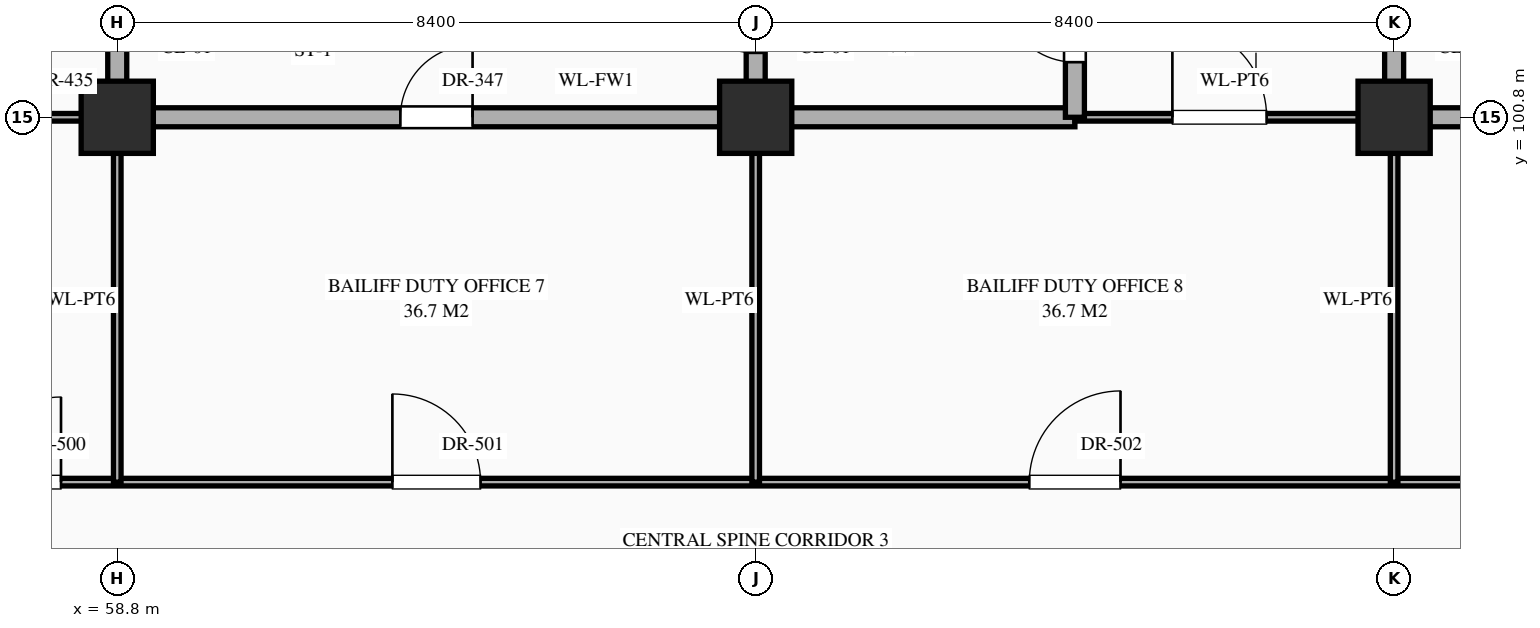
"""IFC4 building model, lengths in metres.
Left out: names, types, materials, properties, quantities, classifications, styles, units other than length and angle.
Written with IfcOpenShell. Run it as: python <this file> out.ifc"""

import sys

from ifc_helpers import new_model, si_unit, direction, frame, frame_2d, origin, origin_2d, place, context, subcontext, project, spatial, rectangle, extrude, element, fill, save


model = new_model("IFC4")
c1 = context("Model", 3, precision=1e-05, world=origin(), true_north=direction((0.0, 1.0)))
c2 = subcontext(c1, "Body", "Model", "MODEL_VIEW")
j1 = project(units=[si_unit("LENGTHUNIT", "METRE"), si_unit("PLANEANGLEUNIT", "RADIAN")], contexts=[c1])
p1 = place(None, origin())
s1 = spatial("IfcSite", under=j1, at=p1, CompositionType="ELEMENT")
p2 = place(p1, origin())
s2 = spatial("IfcBuilding", under=s1, at=p2, CompositionType="ELEMENT")
p3 = place(p2, frame((0.0, 0.0, -5.4)))
s3 = spatial("IfcBuildingStorey", under=s2, at=p3, CompositionType="ELEMENT", Elevation=-5.4)
for number, where, z_axis, x_axis in (
    (1, (58.8, 100.8, 0.0), (0.0, 0.0, 1.0), (1.0, 0.0, 0.0)),
    (2, (67.2, 100.8, 0.0), (0.0, 0.0, 1.0), (1.0, 0.0, 0.0)),
    (3, (75.6, 100.8, 0.0), (0.0, 0.0, 1.0), (1.0, 0.0, 0.0)),
):
    element("IfcColumn", number, at=place(p3, frame(where, z_axis=z_axis, x_axis=x_axis)), inside=s3, PredefinedType="COLUMN", context=c2, shape_type="SweptSolid", body=[
        extrude(rectangle(XDim=0.95, YDim=0.95, at=origin_2d()), origin(), (0.0, 0.0, 1.0), 5.4),
    ])
p4 = place(p3, frame((16.8, 96.0, 0.0), z_axis=(0.0, 0.0, 1.0), x_axis=(1.0, 0.0, 0.0)))
e4 = element("IfcWall", 4, at=p4, inside=s3, PredefinedType="STANDARD", context=c2, shape_type="SweptSolid", body=[
    extrude(rectangle(XDim=134.4, YDim=0.1, at=frame_2d((67.2, 0.0))), origin(), (0.0, 0.0, 1.0), 5.1),
])
p5 = place(p4, frame((3.56, 0.0, 0.0)))
e5 = element("IfcOpeningElement", 5, at=p5, cuts=e4, PredefinedType="OPENING", context=c2, shape_type="SweptSolid", body=[
    extrude(rectangle(XDim=1.28, YDim=2.35, at=frame_2d((0.64, 1.175))), frame((0.0, 0.062, 0.0), z_axis=(0.0, -1.0, 0.0), x_axis=(1.0, 0.0, 0.0)), (0.0, 0.0, 1.0), 0.124),
])
p6 = place(p4, frame((9.63, 0.0, 0.0)))
e6 = element("IfcOpeningElement", 6, at=p6, cuts=e4, PredefinedType="OPENING", context=c2, shape_type="SweptSolid", body=[
    extrude(rectangle(XDim=0.94, YDim=2.3, at=frame_2d((0.47, 1.15))), frame((0.0, 0.062, 0.0), z_axis=(0.0, -1.0, 0.0), x_axis=(1.0, 0.0, 0.0)), (0.0, 0.0, 1.0), 0.124),
])
p7 = place(p4, frame((12.51, 0.0, 0.0)))
e7 = element("IfcOpeningElement", 7, at=p7, cuts=e4, PredefinedType="OPENING", context=c2, shape_type="SweptSolid", body=[
    extrude(rectangle(XDim=0.98, YDim=2.35, at=frame_2d((0.49, 1.175))), frame((0.0, 0.062, 0.0), z_axis=(0.0, -1.0, 0.0), x_axis=(1.0, 0.0, 0.0)), (0.0, 0.0, 1.0), 0.124),
])
p8 = place(p4, frame((14.99, 0.0, 0.0)))
e8 = element("IfcOpeningElement", 8, at=p8, cuts=e4, PredefinedType="OPENING", context=c2, shape_type="SweptSolid", body=[
    extrude(rectangle(XDim=1.02, YDim=2.4, at=frame_2d((0.51, 1.2))), frame((0.0, 0.062, 0.0), z_axis=(0.0, -1.0, 0.0), x_axis=(1.0, 0.0, 0.0)), (0.0, 0.0, 1.0), 0.124),
])
p9 = place(p4, frame((20.47, 0.0, 0.0)))
e9 = element("IfcOpeningElement", 9, at=p9, cuts=e4, PredefinedType="OPENING", context=c2, shape_type="SweptSolid", body=[
    extrude(rectangle(XDim=1.06, YDim=2.4, at=frame_2d((0.53, 1.2))), frame((0.0, 0.062, 0.0), z_axis=(0.0, -1.0, 0.0), x_axis=(1.0, 0.0, 0.0)), (0.0, 0.0, 1.0), 0.124),
])
p10 = place(p4, frame((28.83, 0.0, 0.0)))
e10 = element("IfcOpeningElement", 10, at=p10, cuts=e4, PredefinedType="OPENING", context=c2, shape_type="SweptSolid", body=[
    extrude(rectangle(XDim=1.14, YDim=2.4, at=frame_2d((0.57, 1.2))), frame((0.0, 0.062, 0.0), z_axis=(0.0, -1.0, 0.0), x_axis=(1.0, 0.0, 0.0)), (0.0, 0.0, 1.0), 0.124),
])
p11 = place(p4, frame((34.78, 0.0, 0.0)))
e11 = element("IfcOpeningElement", 11, at=p11, cuts=e4, PredefinedType="OPENING", context=c2, shape_type="SweptSolid", body=[
    extrude(rectangle(XDim=1.04, YDim=2.2, at=frame_2d((0.52, 1.1))), frame((0.0, 0.062, 0.0), z_axis=(0.0, -1.0, 0.0), x_axis=(1.0, 0.0, 0.0)), (0.0, 0.0, 1.0), 0.124),
])
p12 = place(p4, frame((37.66, 0.0, 0.0)))
e12 = element("IfcOpeningElement", 12, at=p12, cuts=e4, PredefinedType="OPENING", context=c2, shape_type="SweptSolid", body=[
    extrude(rectangle(XDim=1.08, YDim=2.25, at=frame_2d((0.54, 1.125))), frame((0.0, 0.062, 0.0), z_axis=(0.0, -1.0, 0.0), x_axis=(1.0, 0.0, 0.0)), (0.0, 0.0, 1.0), 0.124),
])
p13 = place(p4, frame((40.14, 0.0, 0.0)))
e13 = element("IfcOpeningElement", 13, at=p13, cuts=e4, PredefinedType="OPENING", context=c2, shape_type="SweptSolid", body=[
    extrude(rectangle(XDim=1.12, YDim=2.25, at=frame_2d((0.56, 1.125))), frame((0.0, 0.062, 0.0), z_axis=(0.0, -1.0, 0.0), x_axis=(1.0, 0.0, 0.0)), (0.0, 0.0, 1.0), 0.124),
])
p14 = place(p4, frame((45.62, 0.0, 0.0)))
e14 = element("IfcOpeningElement", 14, at=p14, cuts=e4, PredefinedType="OPENING", context=c2, shape_type="SweptSolid", body=[
    extrude(rectangle(XDim=1.16, YDim=2.3, at=frame_2d((0.58, 1.15))), frame((0.0, 0.062, 0.0), z_axis=(0.0, -1.0, 0.0), x_axis=(1.0, 0.0, 0.0)), (0.0, 0.0, 1.0), 0.124),
])
p15 = place(p4, frame((54.0, 0.0, 0.0)))
e15 = element("IfcOpeningElement", 15, at=p15, cuts=e4, PredefinedType="OPENING", context=c2, shape_type="SweptSolid", body=[
    extrude(rectangle(XDim=1.2, YDim=2.35, at=frame_2d((0.6, 1.175))), frame((0.0, 0.062, 0.0), z_axis=(0.0, -1.0, 0.0), x_axis=(1.0, 0.0, 0.0)), (0.0, 0.0, 1.0), 0.124),
])
p16 = place(p4, frame((62.38, 0.0, 0.0)))
e16 = element("IfcOpeningElement", 16, at=p16, cuts=e4, PredefinedType="OPENING", context=c2, shape_type="SweptSolid", body=[
    extrude(rectangle(XDim=1.24, YDim=2.3, at=frame_2d((0.62, 1.15))), frame((0.0, 0.062, 0.0), z_axis=(0.0, -1.0, 0.0), x_axis=(1.0, 0.0, 0.0)), (0.0, 0.0, 1.0), 0.124),
])
p17 = place(p4, frame((68.37, 0.0, 0.0)))
e17 = element("IfcOpeningElement", 17, at=p17, cuts=e4, PredefinedType="OPENING", context=c2, shape_type="SweptSolid", body=[
    extrude(rectangle(XDim=1.06, YDim=2.4, at=frame_2d((0.53, 1.2))), frame((0.0, 0.062, 0.0), z_axis=(0.0, -1.0, 0.0), x_axis=(1.0, 0.0, 0.0)), (0.0, 0.0, 1.0), 0.124),
])
p18 = place(p4, frame((71.23, 0.0, 0.0)))
e18 = element("IfcOpeningElement", 18, at=p18, cuts=e4, PredefinedType="OPENING", context=c2, shape_type="SweptSolid", body=[
    extrude(rectangle(XDim=1.14, YDim=2.4, at=frame_2d((0.57, 1.2))), frame((0.0, 0.062, 0.0), z_axis=(0.0, -1.0, 0.0), x_axis=(1.0, 0.0, 0.0)), (0.0, 0.0, 1.0), 0.124),
])
p19 = place(p4, frame((73.85, 0.0, 0.0)))
e19 = element("IfcOpeningElement", 19, at=p19, cuts=e4, PredefinedType="OPENING", context=c2, shape_type="SweptSolid", body=[
    extrude(rectangle(XDim=0.9, YDim=2.15, at=frame_2d((0.45, 1.075))), frame((0.0, 0.062, 0.0), z_axis=(0.0, -1.0, 0.0), x_axis=(1.0, 0.0, 0.0)), (0.0, 0.0, 1.0), 0.124),
])
p20 = place(p4, frame((79.37, 0.0, 0.0)))
e20 = element("IfcOpeningElement", 20, at=p20, cuts=e4, PredefinedType="OPENING", context=c2, shape_type="SweptSolid", body=[
    extrude(rectangle(XDim=0.86, YDim=2.1, at=frame_2d((0.43, 1.05))), frame((0.0, 0.062, 0.0), z_axis=(0.0, -1.0, 0.0), x_axis=(1.0, 0.0, 0.0)), (0.0, 0.0, 1.0), 0.124),
])
p21 = place(p4, frame((87.74, 0.0, 0.0)))
e21 = element("IfcOpeningElement", 21, at=p21, cuts=e4, PredefinedType="OPENING", context=c2, shape_type="SweptSolid", body=[
    extrude(rectangle(XDim=0.92, YDim=2.15, at=frame_2d((0.46, 1.075))), frame((0.0, 0.062, 0.0), z_axis=(0.0, -1.0, 0.0), x_axis=(1.0, 0.0, 0.0)), (0.0, 0.0, 1.0), 0.124),
])
p22 = place(p4, frame((93.62, 0.0, 0.0)))
e22 = element("IfcOpeningElement", 22, at=p22, cuts=e4, PredefinedType="OPENING", context=c2, shape_type="SweptSolid", body=[
    extrude(rectangle(XDim=0.96, YDim=2.2, at=frame_2d((0.48, 1.1))), frame((0.0, 0.062, 0.0), z_axis=(0.0, -1.0, 0.0), x_axis=(1.0, 0.0, 0.0)), (0.0, 0.0, 1.0), 0.124),
])
p23 = place(p4, frame((96.5, 0.0, 0.0)))
e23 = element("IfcOpeningElement", 23, at=p23, cuts=e4, PredefinedType="OPENING", context=c2, shape_type="SweptSolid", body=[
    extrude(rectangle(XDim=1.0, YDim=2.25, at=frame_2d((0.5, 1.125))), frame((0.0, 0.062, 0.0), z_axis=(0.0, -1.0, 0.0), x_axis=(1.0, 0.0, 0.0)), (0.0, 0.0, 1.0), 0.124),
])
p24 = place(p4, frame((98.98, 0.0, 0.0)))
e24 = element("IfcOpeningElement", 24, at=p24, cuts=e4, PredefinedType="OPENING", context=c2, shape_type="SweptSolid", body=[
    extrude(rectangle(XDim=1.04, YDim=2.2, at=frame_2d((0.52, 1.1))), frame((0.0, 0.062, 0.0), z_axis=(0.0, -1.0, 0.0), x_axis=(1.0, 0.0, 0.0)), (0.0, 0.0, 1.0), 0.124),
])
p25 = place(p4, frame((104.53, 0.0, 0.0)))
e25 = element("IfcOpeningElement", 25, at=p25, cuts=e4, PredefinedType="OPENING", context=c2, shape_type="SweptSolid", body=[
    extrude(rectangle(XDim=0.94, YDim=2.3, at=frame_2d((0.47, 1.15))), frame((0.0, 0.062, 0.0), z_axis=(0.0, -1.0, 0.0), x_axis=(1.0, 0.0, 0.0)), (0.0, 0.0, 1.0), 0.124),
])
p26 = place(p4, frame((112.91, 0.0, 0.0)))
e26 = element("IfcOpeningElement", 26, at=p26, cuts=e4, PredefinedType="OPENING", context=c2, shape_type="SweptSolid", body=[
    extrude(rectangle(XDim=0.98, YDim=2.35, at=frame_2d((0.49, 1.175))), frame((0.0, 0.062, 0.0), z_axis=(0.0, -1.0, 0.0), x_axis=(1.0, 0.0, 0.0)), (0.0, 0.0, 1.0), 0.124),
])
p27 = place(p4, frame((118.79, 0.0, 0.0)))
e27 = element("IfcOpeningElement", 27, at=p27, cuts=e4, PredefinedType="OPENING", context=c2, shape_type="SweptSolid", body=[
    extrude(rectangle(XDim=1.02, YDim=2.4, at=frame_2d((0.51, 1.2))), frame((0.0, 0.062, 0.0), z_axis=(0.0, -1.0, 0.0), x_axis=(1.0, 0.0, 0.0)), (0.0, 0.0, 1.0), 0.124),
])
p28 = place(p4, frame((121.67, 0.0, 0.0)))
e28 = element("IfcOpeningElement", 28, at=p28, cuts=e4, PredefinedType="OPENING", context=c2, shape_type="SweptSolid", body=[
    extrude(rectangle(XDim=1.06, YDim=2.4, at=frame_2d((0.53, 1.2))), frame((0.0, 0.062, 0.0), z_axis=(0.0, -1.0, 0.0), x_axis=(1.0, 0.0, 0.0)), (0.0, 0.0, 1.0), 0.124),
])
p29 = place(p4, frame((124.13, 0.0, 0.0)))
e29 = element("IfcOpeningElement", 29, at=p29, cuts=e4, PredefinedType="OPENING", context=c2, shape_type="SweptSolid", body=[
    extrude(rectangle(XDim=1.14, YDim=2.4, at=frame_2d((0.57, 1.2))), frame((0.0, 0.062, 0.0), z_axis=(0.0, -1.0, 0.0), x_axis=(1.0, 0.0, 0.0)), (0.0, 0.0, 1.0), 0.124),
])
p30 = place(p4, frame((129.75, 0.0, 0.0)))
e30 = element("IfcOpeningElement", 30, at=p30, cuts=e4, PredefinedType="OPENING", context=c2, shape_type="SweptSolid", body=[
    extrude(rectangle(XDim=0.9, YDim=2.15, at=frame_2d((0.45, 1.075))), frame((0.0, 0.062, 0.0), z_axis=(0.0, -1.0, 0.0), x_axis=(1.0, 0.0, 0.0)), (0.0, 0.0, 1.0), 0.124),
])
p31 = place(p3, frame((54.6, 100.8, 0.0), z_axis=(0.0, 0.0, 1.0), x_axis=(1.0, 0.0, 0.0)))
e31 = element("IfcWall", 31, at=p31, inside=s3, PredefinedType="STANDARD", context=c2, shape_type="SweptSolid", body=[
    extrude(rectangle(XDim=4.2, YDim=0.1, at=frame_2d((2.1, 0.0))), origin(), (0.0, 0.0, 1.0), 4.25),
])
p32 = place(p31, frame((0.2, 0.0, 0.0)))
e32 = element("IfcOpeningElement", 32, at=p32, cuts=e31, PredefinedType="OPENING", context=c2, shape_type="SweptSolid", body=[
    extrude(rectangle(XDim=1.2, YDim=2.35, at=frame_2d((0.6, 1.175))), frame((0.0, 0.062, 0.0), z_axis=(0.0, -1.0, 0.0), x_axis=(1.0, 0.0, 0.0)), (0.0, 0.0, 1.0), 0.124),
])
p33 = place(p31, frame((2.083, 0.0, 0.0)))
e33 = element("IfcOpeningElement", 33, at=p33, cuts=e31, PredefinedType="OPENING", context=c2, shape_type="SweptSolid", body=[
    extrude(rectangle(XDim=1.24, YDim=2.3, at=frame_2d((0.62, 1.15))), frame((0.0, 0.062, 0.0), z_axis=(0.0, -1.0, 0.0), x_axis=(1.0, 0.0, 0.0)), (0.0, 0.0, 1.0), 0.124),
])
p34 = place(p3, frame((58.8, 100.8, 0.0), z_axis=(0.0, 0.0, 1.0), x_axis=(1.0, 0.0, 0.0)))
e34 = element("IfcWall", 34, at=p34, inside=s3, PredefinedType="STANDARD", context=c2, shape_type="SweptSolid", body=[
    extrude(rectangle(XDim=12.6, YDim=0.25, at=frame_2d((6.3, 0.0))), origin(), (0.0, 0.0, 1.0), 4.25),
])
p35 = place(p34, frame((3.725, 0.0, 0.0)))
e35 = element("IfcOpeningElement", 35, at=p35, cuts=e34, PredefinedType="OPENING", context=c2, shape_type="SweptSolid", body=[
    extrude(rectangle(XDim=0.95, YDim=2.15, at=frame_2d((0.475, 1.075))), frame((0.0, 0.137, 0.0), z_axis=(0.0, -1.0, 0.0), x_axis=(1.0, 0.0, 0.0)), (0.0, 0.0, 1.0), 0.274),
])
p36 = place(p3, frame((71.4, 100.8, 0.0), z_axis=(0.0, 0.0, 1.0), x_axis=(1.0, 0.0, 0.0)))
e36 = element("IfcWall", 36, at=p36, inside=s3, PredefinedType="STANDARD", context=c2, shape_type="SweptSolid", body=[
    extrude(rectangle(XDim=4.2, YDim=0.1, at=frame_2d((2.1, 0.0))), origin(), (0.0, 0.0, 1.0), 4.25),
])
p37 = place(p36, frame((1.282, 0.0, 0.0)))
e37 = element("IfcOpeningElement", 37, at=p37, cuts=e36, PredefinedType="OPENING", context=c2, shape_type="SweptSolid", body=[
    extrude(rectangle(XDim=1.24, YDim=2.3, at=frame_2d((0.62, 1.15))), frame((0.0, 0.062, 0.0), z_axis=(0.0, -1.0, 0.0), x_axis=(1.0, 0.0, 0.0)), (0.0, 0.0, 1.0), 0.124),
])
p38 = place(p3, frame((75.6, 100.8, 0.0), z_axis=(0.0, 0.0, 1.0), x_axis=(1.0, 0.0, 0.0)))
e38 = element("IfcWall", 38, at=p38, inside=s3, PredefinedType="STANDARD", context=c2, shape_type="SweptSolid", body=[
    extrude(rectangle(XDim=16.8, YDim=0.25, at=frame_2d((8.4, 0.0))), origin(), (0.0, 0.0, 1.0), 4.25),
])
p39 = place(p38, frame((3.7, 0.0, 0.0)))
e39 = element("IfcOpeningElement", 39, at=p39, cuts=e38, PredefinedType="OPENING", context=c2, shape_type="SweptSolid", body=[
    extrude(rectangle(XDim=1.0, YDim=2.2, at=frame_2d((0.5, 1.1))), frame((0.0, 0.137, 0.0), z_axis=(0.0, -1.0, 0.0), x_axis=(1.0, 0.0, 0.0)), (0.0, 0.0, 1.0), 0.274),
])
p40 = place(p38, frame((9.748, 0.0, 0.0)))
e40 = element("IfcOpeningElement", 40, at=p40, cuts=e38, PredefinedType="OPENING", context=c2, shape_type="SweptSolid", body=[
    extrude(rectangle(XDim=1.1, YDim=2.2, at=frame_2d((0.55, 1.1))), frame((0.0, 0.137, 0.0), z_axis=(0.0, -1.0, 0.0), x_axis=(1.0, 0.0, 0.0)), (0.0, 0.0, 1.0), 0.274),
])
p41 = place(p38, frame((12.5, 0.0, 0.0)))
e41 = element("IfcOpeningElement", 41, at=p41, cuts=e38, PredefinedType="OPENING", context=c2, shape_type="SweptSolid", body=[
    extrude(rectangle(XDim=1.0, YDim=2.2, at=frame_2d((0.5, 1.1))), frame((0.0, 0.137, 0.0), z_axis=(0.0, -1.0, 0.0), x_axis=(1.0, 0.0, 0.0)), (0.0, 0.0, 1.0), 0.274),
])
p42 = place(p38, frame((14.827, 0.0, 0.0)))
e42 = element("IfcOpeningElement", 42, at=p42, cuts=e38, PredefinedType="OPENING", context=c2, shape_type="SweptSolid", body=[
    extrude(rectangle(XDim=0.95, YDim=2.15, at=frame_2d((0.475, 1.075))), frame((0.0, 0.137, 0.0), z_axis=(0.0, -1.0, 0.0), x_axis=(1.0, 0.0, 0.0)), (0.0, 0.0, 1.0), 0.274),
])
p43 = place(p3, frame((58.8, 96.0, 0.0), z_axis=(0.0, 0.0, 1.0), x_axis=(0.0, 1.0, 0.0)))
e43 = element("IfcWall", 43, at=p43, inside=s3, PredefinedType="STANDARD", context=c2, shape_type="SweptSolid", body=[
    extrude(rectangle(XDim=4.8, YDim=0.1, at=frame_2d((2.4, 0.0))), origin(), (0.0, 0.0, 1.0), 4.35),
])
p44 = place(p3, frame((58.8, 100.8, 0.0), z_axis=(0.0, 0.0, 1.0), x_axis=(0.0, 1.0, 0.0)))
e44 = element("IfcWall", 44, at=p44, inside=s3, PredefinedType="STANDARD", context=c2, shape_type="SweptSolid", body=[
    extrude(rectangle(XDim=2.4, YDim=0.25, at=frame_2d((1.2, 0.0))), origin(), (0.0, 0.0, 1.0), 4.35),
])
p45 = place(p44, frame((0.897, 0.0, 0.0)))
e45 = element("IfcOpeningElement", 45, at=p45, cuts=e44, PredefinedType="OPENING", context=c2, shape_type="SweptSolid", body=[
    extrude(rectangle(XDim=1.0, YDim=2.2, at=frame_2d((0.5, 1.1))), frame((0.0, 0.137, 0.0), z_axis=(0.0, -1.0, 0.0), x_axis=(1.0, 0.0, 0.0)), (0.0, 0.0, 1.0), 0.274),
])
p46 = place(p3, frame((67.2, 96.0, 0.0), z_axis=(0.0, 0.0, 1.0), x_axis=(0.0, 1.0, 0.0)))
e46 = element("IfcWall", 46, at=p46, inside=s3, PredefinedType="STANDARD", context=c2, shape_type="SweptSolid", body=[
    extrude(rectangle(XDim=4.8, YDim=0.1, at=frame_2d((2.4, 0.0))), origin(), (0.0, 0.0, 1.0), 4.35),
])
p47 = place(p3, frame((67.2, 100.8, 0.0), z_axis=(0.0, 0.0, 1.0), x_axis=(0.0, 1.0, 0.0)))
e47 = element("IfcWall", 47, at=p47, inside=s3, PredefinedType="STANDARD", context=c2, shape_type="SweptSolid", body=[
    extrude(rectangle(XDim=2.4, YDim=0.25, at=frame_2d((1.2, 0.0))), origin(), (0.0, 0.0, 1.0), 4.35),
])
p48 = place(p47, frame((0.847, 0.0, 0.0)))
e48 = element("IfcOpeningElement", 48, at=p48, cuts=e47, PredefinedType="OPENING", context=c2, shape_type="SweptSolid", body=[
    extrude(rectangle(XDim=1.1, YDim=2.2, at=frame_2d((0.55, 1.1))), frame((0.0, 0.137, 0.0), z_axis=(0.0, -1.0, 0.0), x_axis=(1.0, 0.0, 0.0)), (0.0, 0.0, 1.0), 0.274),
])
p49 = place(p3, frame((71.4, 100.8, 0.0), z_axis=(0.0, 0.0, 1.0), x_axis=(0.0, 1.0, 0.0)))
e49 = element("IfcWall", 49, at=p49, inside=s3, PredefinedType="STANDARD", context=c2, shape_type="SweptSolid", body=[
    extrude(rectangle(XDim=3.6, YDim=0.25, at=frame_2d((1.8, 0.0))), origin(), (0.0, 0.0, 1.0), 4.55),
])
p50 = place(p49, frame((0.725, 0.0, 0.0)))
e50 = element("IfcOpeningElement", 50, at=p50, cuts=e49, PredefinedType="OPENING", context=c2, shape_type="SweptSolid", body=[
    extrude(rectangle(XDim=0.95, YDim=2.15, at=frame_2d((0.475, 1.075))), frame((0.0, 0.137, 0.0), z_axis=(0.0, -1.0, 0.0), x_axis=(1.0, 0.0, 0.0)), (0.0, 0.0, 1.0), 0.274),
])
p51 = place(p3, frame((75.6, 96.0, 0.0), z_axis=(0.0, 0.0, 1.0), x_axis=(0.0, 1.0, 0.0)))
e51 = element("IfcWall", 51, at=p51, inside=s3, PredefinedType="STANDARD", context=c2, shape_type="SweptSolid", body=[
    extrude(rectangle(XDim=4.8, YDim=0.1, at=frame_2d((2.4, 0.0))), origin(), (0.0, 0.0, 1.0), 4.35),
])
p52 = place(p3, frame((75.6, 100.8, 0.0), z_axis=(0.0, 0.0, 1.0), x_axis=(0.0, 1.0, 0.0)))
e52 = element("IfcWall", 52, at=p52, inside=s3, PredefinedType="STANDARD", context=c2, shape_type="SweptSolid", body=[
    extrude(rectangle(XDim=3.6, YDim=0.25, at=frame_2d((1.8, 0.0))), origin(), (0.0, 0.0, 1.0), 4.35),
])
p53 = place(p52, frame((0.897, 0.0, 0.0)))
e53 = element("IfcOpeningElement", 53, at=p53, cuts=e52, PredefinedType="OPENING", context=c2, shape_type="SweptSolid", body=[
    extrude(rectangle(XDim=1.0, YDim=2.2, at=frame_2d((0.5, 1.1))), frame((0.0, 0.137, 0.0), z_axis=(0.0, -1.0, 0.0), x_axis=(1.0, 0.0, 0.0)), (0.0, 0.0, 1.0), 0.274),
])
p54 = place(p48, origin())
e54 = element("IfcDoor", 54, at=p54, inside=s3, OperationType="SINGLE_SWING_RIGHT", PredefinedType="DOOR", context=c2, shape_type="SweptSolid", body=[
    extrude(rectangle(XDim=1.1, YDim=2.2, at=frame_2d((0.55, 1.1))), frame((0.0, 0.025, 0.0), z_axis=(0.0, -1.0, 0.0), x_axis=(1.0, 0.0, 0.0)), (0.0, 0.0, 1.0), 0.05),
])
fill(e48, e54)
p55 = place(p35, origin())
e55 = element("IfcDoor", 55, at=p55, inside=s3, OperationType="SINGLE_SWING_RIGHT", PredefinedType="DOOR", context=c2, shape_type="SweptSolid", body=[
    extrude(rectangle(XDim=0.95, YDim=2.15, at=frame_2d((0.475, 1.075))), frame((0.0, 0.025, 0.0), z_axis=(0.0, -1.0, 0.0), x_axis=(1.0, 0.0, 0.0)), (0.0, 0.0, 1.0), 0.05),
])
fill(e35, e55)
p56 = place(p50, origin())
e56 = element("IfcDoor", 56, at=p56, inside=s3, OperationType="SINGLE_SWING_RIGHT", PredefinedType="DOOR", context=c2, shape_type="SweptSolid", body=[
    extrude(rectangle(XDim=0.95, YDim=2.15, at=frame_2d((0.475, 1.075))), frame((0.0, 0.025, 0.0), z_axis=(0.0, -1.0, 0.0), x_axis=(1.0, 0.0, 0.0)), (0.0, 0.0, 1.0), 0.05),
])
fill(e50, e56)
p57 = place(p37, origin())
e57 = element("IfcDoor", 57, at=p57, inside=s3, OperationType="SINGLE_SWING_LEFT", PredefinedType="DOOR", context=c2, shape_type="SweptSolid", body=[
    extrude(rectangle(XDim=1.24, YDim=2.3, at=frame_2d((0.62, 1.15))), frame((0.0, 0.025, 0.0), z_axis=(0.0, -1.0, 0.0), x_axis=(1.0, 0.0, 0.0)), (0.0, 0.0, 1.0), 0.05),
])
fill(e37, e57)
p58 = place(p13, origin())
e58 = element("IfcDoor", 58, at=p58, inside=s3, OperationType="SINGLE_SWING_RIGHT", PredefinedType="DOOR", context=c2, shape_type="SweptSolid", body=[
    extrude(rectangle(XDim=1.12, YDim=2.25, at=frame_2d((0.56, 1.125))), frame((0.0, 0.025, 0.0), z_axis=(0.0, -1.0, 0.0), x_axis=(1.0, 0.0, 0.0)), (0.0, 0.0, 1.0), 0.05),
])
fill(e13, e58)
p59 = place(p14, origin())
e59 = element("IfcDoor", 59, at=p59, inside=s3, OperationType="SINGLE_SWING_LEFT", PredefinedType="DOOR", context=c2, shape_type="SweptSolid", body=[
    extrude(rectangle(XDim=1.16, YDim=2.3, at=frame_2d((0.58, 1.15))), frame((0.0, 0.025, 0.0), z_axis=(0.0, -1.0, 0.0), x_axis=(1.0, 0.0, 0.0)), (0.0, 0.0, 1.0), 0.05),
])
fill(e14, e59)
p60 = place(p15, origin())
e60 = element("IfcDoor", 60, at=p60, inside=s3, OperationType="SINGLE_SWING_RIGHT", PredefinedType="DOOR", context=c2, shape_type="SweptSolid", body=[
    extrude(rectangle(XDim=1.2, YDim=2.35, at=frame_2d((0.6, 1.175))), frame((0.0, 0.025, 0.0), z_axis=(0.0, -1.0, 0.0), x_axis=(1.0, 0.0, 0.0)), (0.0, 0.0, 1.0), 0.05),
])
fill(e15, e60)
save(model, sys.argv[1])
